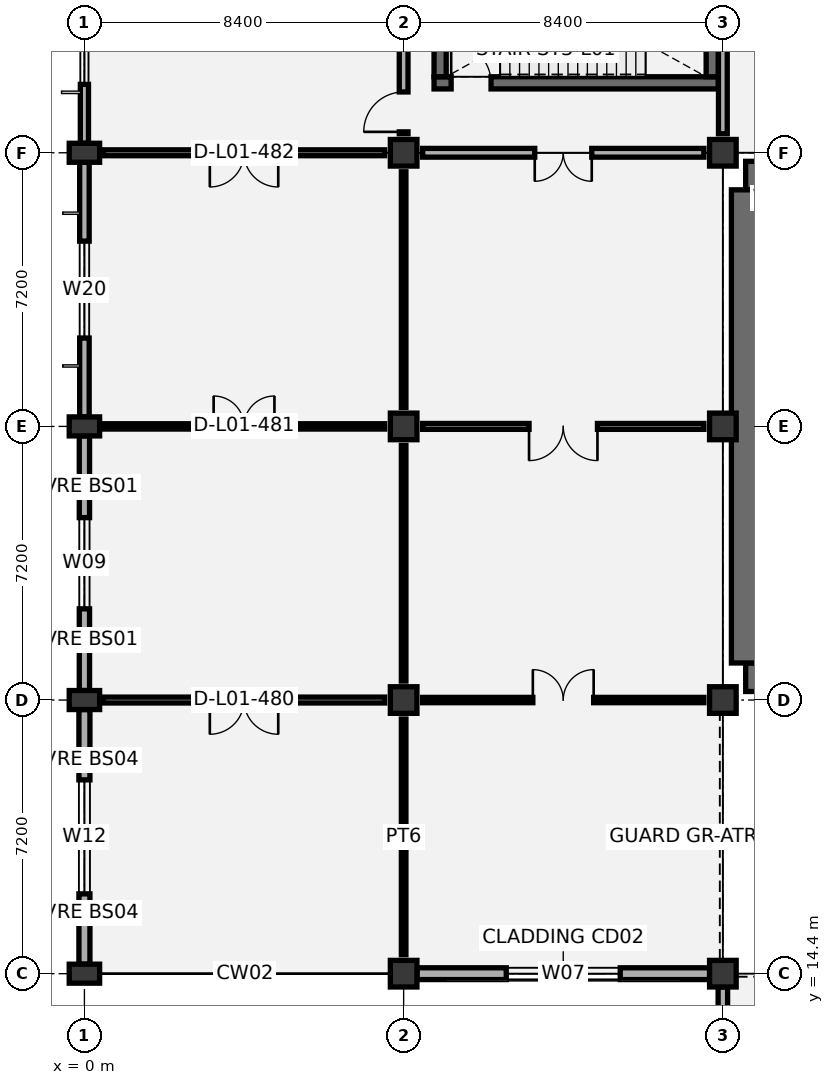
"""IFC4 building model, lengths in metres.
Left out: names, types, materials, properties, quantities, classifications, styles, units other than length and angle.
Written with IfcOpenShell. Run it as: python <this file> out.ifc"""

import sys

from ifc_helpers import new_model, si_unit, direction, frame, frame_2d, origin, origin_2d, place, context, subcontext, project, spatial, rectangle, extrude, element, fill, save


model = new_model("IFC4")
c1 = context("Model", 3, precision=1e-05, world=origin(), true_north=direction((0.0, 1.0)))
c2 = subcontext(c1, "Body", "Model", "MODEL_VIEW")
j1 = project(units=[si_unit("LENGTHUNIT", "METRE"), si_unit("PLANEANGLEUNIT", "RADIAN")], contexts=[c1])
p1 = place(None, origin())
s1 = spatial("IfcSite", under=j1, at=p1, CompositionType="ELEMENT")
p2 = place(p1, origin())
s2 = spatial("IfcBuilding", under=s1, at=p2, CompositionType="ELEMENT")
p3 = place(p2, frame((0.0, 0.0, 6.0)))
s3 = spatial("IfcBuildingStorey", under=s2, at=p3, CompositionType="ELEMENT", Elevation=6.0)
for number, where, z_axis, x_axis in (
    (1, (0.0, 14.4, 0.0), (0.0, 0.0, 1.0), (0.0, 1.0, 0.0)),
    (2, (0.0, 21.6, 0.0), (0.0, 0.0, 1.0), (0.0, 1.0, 0.0)),
    (3, (0.0, 28.8, 0.0), (0.0, 0.0, 1.0), (0.0, 1.0, 0.0)),
    (4, (0.0, 36.0, 0.0), (0.0, 0.0, 1.0), (0.0, 1.0, 0.0)),
):
    element("IfcColumn", number, at=place(p3, frame(where, z_axis=z_axis, x_axis=x_axis)), inside=s3, PredefinedType="COLUMN", context=c2, shape_type="SweptSolid", body=[
        extrude(rectangle(XDim=0.5, YDim=0.8, at=origin_2d()), origin(), (0.0, 0.0, 1.0), 5.4),
    ])
for number, where, z_axis, x_axis in (
    (5, (8.4, 14.4, 0.0), (0.0, 0.0, 1.0), (1.0, 0.0, 0.0)),
    (6, (8.4, 21.6, 0.0), (0.0, 0.0, 1.0), (1.0, 0.0, 0.0)),
    (7, (8.4, 28.8, 0.0), (0.0, 0.0, 1.0), (1.0, 0.0, 0.0)),
    (8, (8.4, 36.0, 0.0), (0.0, 0.0, 1.0), (1.0, 0.0, 0.0)),
    (9, (16.8, 14.4, 0.0), (0.0, 0.0, 1.0), (1.0, 0.0, 0.0)),
    (10, (16.8, 21.6, 0.0), (0.0, 0.0, 1.0), (1.0, 0.0, 0.0)),
    (11, (16.8, 28.8, 0.0), (0.0, 0.0, 1.0), (1.0, 0.0, 0.0)),
    (12, (16.8, 36.0, 0.0), (0.0, 0.0, 1.0), (1.0, 0.0, 0.0)),
):
    element("IfcColumn", number, at=place(p3, frame(where, z_axis=z_axis, x_axis=x_axis)), inside=s3, PredefinedType="COLUMN", context=c2, shape_type="SweptSolid", body=[
        extrude(rectangle(XDim=0.7, YDim=0.7, at=origin_2d()), origin(), (0.0, 0.0, 1.0), 5.4),
    ])
for number, where, z_axis, x_axis in (
    (13, (17.4, 22.2, 0.0), (0.0, 0.0, 1.0), (1.0, 0.0, 0.0)),
    (14, (17.4, 35.4, 0.0), (0.0, 0.0, 1.0), (1.0, 0.0, 0.0)),
):
    element("IfcWall", number, at=place(p3, frame(where, z_axis=z_axis, x_axis=x_axis)), inside=s3, PredefinedType="SOLIDWALL", context=c2, shape_type="SweptSolid", body=[
        extrude(rectangle(XDim=24.0, YDim=0.75, at=frame_2d((12.0, 0.0))), origin(), (0.0, 0.0, 1.0), 3.6),
    ])
p4 = place(p3, frame((17.4, 22.575, 0.0), z_axis=(0.0, 0.0, 1.0), x_axis=(0.0, 1.0, 0.0)))
e15 = element("IfcWall", 15, at=p4, inside=s3, PredefinedType="SOLIDWALL", context=c2, shape_type="SweptSolid", body=[
    extrude(rectangle(XDim=12.45, YDim=0.75, at=frame_2d((6.225, 0.0))), origin(), (0.0, 0.0, 1.0), 3.6),
])
p5 = place(p3, frame((9.2, 37.84, 0.0), z_axis=(0.0, 0.0, 1.0), x_axis=(1.0, 0.0, 0.0)))
e16 = element("IfcWall", 16, at=p5, inside=s3, PredefinedType="SHEAR", context=c2, shape_type="SweptSolid", body=[
    extrude(rectangle(XDim=7.48, YDim=0.32, at=frame_2d((3.74, 0.0))), origin(), (0.0, 0.0, 1.0), 5.075),
])
p6 = place(p5, frame((0.45, 0.0, 0.0)))
e17 = element("IfcOpeningElement", 17, at=p6, cuts=e16, PredefinedType="OPENING", context=c2, shape_type="SweptSolid", body=[
    extrude(rectangle(XDim=1.05, YDim=2.15, at=frame_2d((0.525, 1.075))), frame((0.0, 0.17, 0.0), z_axis=(0.0, -1.0, 0.0), x_axis=(1.0, 0.0, 0.0)), (0.0, 0.0, 1.0), 0.34),
])
for number, where, z_axis, x_axis in (
    (18, (9.36, 38.0, 0.0), (0.0, 0.0, 1.0), (0.0, 1.0, 0.0)),
    (19, (16.52, 38.0, 0.0), (0.0, 0.0, 1.0), (0.0, 1.0, 0.0)),
):
    element("IfcWall", number, at=place(p3, frame(where, z_axis=z_axis, x_axis=x_axis)), inside=s3, PredefinedType="SHEAR", context=c2, shape_type="SweptSolid", body=[
        extrude(rectangle(XDim=3.8, YDim=0.32, at=frame_2d((1.9, 0.0))), origin(), (0.0, 0.0, 1.0), 5.075),
    ])
p7 = place(p3, frame((0.0, 14.65, 0.0), z_axis=(0.0, 0.0, 1.0), x_axis=(0.0, 1.0, 0.0)))
e20 = element("IfcWall", 20, at=p7, inside=s3, PredefinedType="SOLIDWALL", context=c2, shape_type="SweptSolid", body=[
    extrude(rectangle(XDim=6.7, YDim=0.29, at=frame_2d((3.35, 0.0))), origin(), (0.0, 0.0, 1.0), 4.52),
])
p8 = place(p7, frame((1.85, 0.0, 0.9)))
e21 = element("IfcOpeningElement", 21, at=p8, cuts=e20, PredefinedType="OPENING", context=c2, shape_type="SweptSolid", body=[
    extrude(rectangle(XDim=3.0, YDim=2.4, at=frame_2d((1.5, 1.2))), frame((0.0, 0.155, 0.0), z_axis=(0.0, -1.0, 0.0), x_axis=(1.0, 0.0, 0.0)), (0.0, 0.0, 1.0), 0.31),
])
p9 = place(p3, frame((0.0, 21.85, 0.0), z_axis=(0.0, 0.0, 1.0), x_axis=(0.0, 1.0, 0.0)))
e22 = element("IfcWall", 22, at=p9, inside=s3, PredefinedType="SOLIDWALL", context=c2, shape_type="SweptSolid", body=[
    extrude(rectangle(XDim=6.7, YDim=0.27, at=frame_2d((3.35, 0.0))), origin(), (0.0, 0.0, 1.0), 4.52),
])
p10 = place(p9, frame((2.15, 0.0, 0.9)))
e23 = element("IfcOpeningElement", 23, at=p10, cuts=e22, PredefinedType="OPENING", context=c2, shape_type="SweptSolid", body=[
    extrude(rectangle(XDim=2.4, YDim=2.1, at=frame_2d((1.2, 1.05))), frame((0.0, 0.145, 0.0), z_axis=(0.0, -1.0, 0.0), x_axis=(1.0, 0.0, 0.0)), (0.0, 0.0, 1.0), 0.29),
])
p11 = place(p3, frame((0.0, 29.05, 0.0), z_axis=(0.0, 0.0, 1.0), x_axis=(0.0, 1.0, 0.0)))
e24 = element("IfcWall", 24, at=p11, inside=s3, PredefinedType="SOLIDWALL", context=c2, shape_type="SweptSolid", body=[
    extrude(rectangle(XDim=6.7, YDim=0.25, at=frame_2d((3.35, 0.0))), origin(), (0.0, 0.0, 1.0), 4.52),
])
p12 = place(p11, frame((2.075, 0.0, 0.9)))
e25 = element("IfcOpeningElement", 25, at=p12, cuts=e24, PredefinedType="OPENING", context=c2, shape_type="SweptSolid", body=[
    extrude(rectangle(XDim=2.55, YDim=1.95, at=frame_2d((1.275, 0.975))), frame((0.0, 0.135, 0.0), z_axis=(0.0, -1.0, 0.0), x_axis=(1.0, 0.0, 0.0)), (0.0, 0.0, 1.0), 0.27),
])
p13 = place(p3, frame((0.0, 36.25, 0.0), z_axis=(0.0, 0.0, 1.0), x_axis=(0.0, 1.0, 0.0)))
e26 = element("IfcWall", 26, at=p13, inside=s3, PredefinedType="SOLIDWALL", context=c2, shape_type="SweptSolid", body=[
    extrude(rectangle(XDim=6.7, YDim=0.215, at=frame_2d((3.35, 0.0))), origin(), (0.0, 0.0, 1.0), 4.52),
])
p14 = place(p13, frame((1.55, 0.0, 0.9)))
e27 = element("IfcOpeningElement", 27, at=p14, cuts=e26, PredefinedType="OPENING", context=c2, shape_type="SweptSolid", body=[
    extrude(rectangle(XDim=3.6, YDim=2.4, at=frame_2d((1.8, 1.2))), frame((0.0, 0.117, 0.0), z_axis=(0.0, -1.0, 0.0), x_axis=(1.0, 0.0, 0.0)), (0.0, 0.0, 1.0), 0.235),
])
p15 = place(p3, frame((8.75, 14.4, 0.0), z_axis=(0.0, 0.0, 1.0), x_axis=(1.0, 0.0, 0.0)))
e28 = element("IfcWall", 28, at=p15, inside=s3, PredefinedType="SOLIDWALL", context=c2, shape_type="SweptSolid", body=[
    extrude(rectangle(XDim=7.7, YDim=0.31, at=frame_2d((3.85, 0.0))), origin(), (0.0, 0.0, 1.0), 4.42),
])
p16 = place(p15, frame((2.35, 0.0, 0.9)))
e29 = element("IfcOpeningElement", 29, at=p16, cuts=e28, PredefinedType="OPENING", context=c2, shape_type="SweptSolid", body=[
    extrude(rectangle(XDim=3.0, YDim=2.1, at=frame_2d((1.5, 1.05))), frame((0.0, 0.165, 0.0), z_axis=(0.0, -1.0, 0.0), x_axis=(1.0, 0.0, 0.0)), (0.0, 0.0, 1.0), 0.33),
])
p17 = place(p3, frame((16.8, 7.55, 0.0), z_axis=(0.0, 0.0, 1.0), x_axis=(0.0, 1.0, 0.0)))
e30 = element("IfcWall", 30, at=p17, inside=s3, PredefinedType="SOLIDWALL", context=c2, shape_type="SweptSolid", body=[
    extrude(rectangle(XDim=6.5, YDim=0.25, at=frame_2d((3.25, 0.0))), origin(), (0.0, 0.0, 1.0), 4.42),
])
p18 = place(p17, frame((1.825, 0.0, 0.9)))
e31 = element("IfcOpeningElement", 31, at=p18, cuts=e30, PredefinedType="OPENING", context=c2, shape_type="SweptSolid", body=[
    extrude(rectangle(XDim=2.85, YDim=1.95, at=frame_2d((1.425, 0.975))), frame((0.0, 0.135, 0.0), z_axis=(0.0, -1.0, 0.0), x_axis=(1.0, 0.0, 0.0)), (0.0, 0.0, 1.0), 0.27),
])
p19 = place(p3, frame((0.0, 7.32, 0.0), z_axis=(0.0, 0.0, 1.0), x_axis=(0.0, 1.0, 0.0)))
e32 = element("IfcWall", 32, at=p19, inside=s3, PredefinedType="PARAPET", context=c2, shape_type="SweptSolid", body=[
    extrude(rectangle(XDim=6.96, YDim=0.22, at=frame_2d((3.48, 0.0))), origin(), (0.0, 0.0, 1.0), 1.15),
])
p20 = place(p3, frame((8.4, 14.9, 0.0), z_axis=(0.0, 0.0, 1.0), x_axis=(0.0, 1.0, 0.0)))
e33 = element("IfcWall", 33, at=p20, inside=s3, PredefinedType="PARTITIONING", context=c2, shape_type="SweptSolid", body=[
    extrude(rectangle(XDim=6.2, YDim=0.12, at=frame_2d((3.1, 0.0))), origin(), (0.0, 0.0, 1.0), 4.57),
])
p21 = place(p3, frame((0.5, 21.6, 0.0), z_axis=(0.0, 0.0, 1.0), x_axis=(1.0, 0.0, 0.0)))
e34 = element("IfcWall", 34, at=p21, inside=s3, PredefinedType="PARTITIONING", context=c2, shape_type="SweptSolid", body=[
    extrude(rectangle(XDim=7.4, YDim=0.155, at=frame_2d((3.7, 0.0))), origin(), (0.0, 0.0, 1.0), 4.37),
])
p22 = place(p21, frame((2.8, 0.0, 0.0)))
e35 = element("IfcOpeningElement", 35, at=p22, cuts=e34, PredefinedType="OPENING", context=c2, shape_type="SweptSolid", body=[
    extrude(rectangle(XDim=1.8, YDim=2.25, at=frame_2d((0.9, 1.125))), frame((0.0, 0.087, 0.0), z_axis=(0.0, -1.0, 0.0), x_axis=(1.0, 0.0, 0.0)), (0.0, 0.0, 1.0), 0.175),
])
p23 = place(p3, frame((8.4, 22.1, 0.0), z_axis=(0.0, 0.0, 1.0), x_axis=(0.0, 1.0, 0.0)))
e36 = element("IfcWall", 36, at=p23, inside=s3, PredefinedType="PARTITIONING", context=c2, shape_type="SweptSolid", body=[
    extrude(rectangle(XDim=6.2, YDim=0.12, at=frame_2d((3.1, 0.0))), origin(), (0.0, 0.0, 1.0), 4.32),
])
p24 = place(p3, frame((0.5, 28.8, 0.0), z_axis=(0.0, 0.0, 1.0), x_axis=(1.0, 0.0, 0.0)))
e37 = element("IfcWall", 37, at=p24, inside=s3, PredefinedType="PARTITIONING", context=c2, shape_type="SweptSolid", body=[
    extrude(rectangle(XDim=7.4, YDim=0.14, at=frame_2d((3.7, 0.0))), origin(), (0.0, 0.0, 1.0), 4.37),
])
p25 = place(p24, frame((2.9, 0.0, 0.0)))
e38 = element("IfcOpeningElement", 38, at=p25, cuts=e37, PredefinedType="OPENING", context=c2, shape_type="SweptSolid", body=[
    extrude(rectangle(XDim=1.6, YDim=2.2, at=frame_2d((0.8, 1.1))), frame((0.0, 0.08, 0.0), z_axis=(0.0, -1.0, 0.0), x_axis=(1.0, 0.0, 0.0)), (0.0, 0.0, 1.0), 0.16),
])
p26 = place(p3, frame((8.4, 29.3, 0.0), z_axis=(0.0, 0.0, 1.0), x_axis=(0.0, 1.0, 0.0)))
e39 = element("IfcWall", 39, at=p26, inside=s3, PredefinedType="PARTITIONING", context=c2, shape_type="SweptSolid", body=[
    extrude(rectangle(XDim=6.2, YDim=0.12, at=frame_2d((3.1, 0.0))), origin(), (0.0, 0.0, 1.0), 4.67),
])
p27 = place(p3, frame((0.5, 36.0, 0.0), z_axis=(0.0, 0.0, 1.0), x_axis=(1.0, 0.0, 0.0)))
e40 = element("IfcWall", 40, at=p27, inside=s3, PredefinedType="PARTITIONING", context=c2, shape_type="SweptSolid", body=[
    extrude(rectangle(XDim=7.4, YDim=0.155, at=frame_2d((3.7, 0.0))), origin(), (0.0, 0.0, 1.0), 4.37),
])
p28 = place(p27, frame((2.8, 0.0, 0.0)))
e41 = element("IfcOpeningElement", 41, at=p28, cuts=e40, PredefinedType="OPENING", context=c2, shape_type="SweptSolid", body=[
    extrude(rectangle(XDim=1.8, YDim=2.25, at=frame_2d((0.9, 1.125))), frame((0.0, 0.087, 0.0), z_axis=(0.0, -1.0, 0.0), x_axis=(1.0, 0.0, 0.0)), (0.0, 0.0, 1.0), 0.175),
])
p29 = place(p3, frame((8.4, 36.5, 0.0), z_axis=(0.0, 0.0, 1.0), x_axis=(0.0, 1.0, 0.0)))
e42 = element("IfcWall", 42, at=p29, inside=s3, PredefinedType="PARTITIONING", context=c2, shape_type="SweptSolid", body=[
    extrude(rectangle(XDim=6.2, YDim=0.23, at=frame_2d((3.1, 0.0))), origin(), (0.0, 0.0, 1.0), 4.32),
])
p30 = place(p29, frame((0.05, 0.0, 0.0)))
e43 = element("IfcOpeningElement", 43, at=p30, cuts=e42, PredefinedType="OPENING", context=c2, shape_type="SweptSolid", body=[
    extrude(rectangle(XDim=1.05, YDim=2.15, at=frame_2d((0.525, 1.075))), frame((0.0, 0.125, 0.0), z_axis=(0.0, -1.0, 0.0), x_axis=(1.0, 0.0, 0.0)), (0.0, 0.0, 1.0), 0.25),
])
p31 = place(p3, frame((8.9, 21.6, 0.0), z_axis=(0.0, 0.0, 1.0), x_axis=(1.0, 0.0, 0.0)))
e44 = element("IfcWall", 44, at=p31, inside=s3, PredefinedType="PARTITIONING", context=c2, shape_type="SweptSolid", body=[
    extrude(rectangle(XDim=7.4, YDim=0.14, at=frame_2d((3.7, 0.0))), origin(), (0.0, 0.0, 1.0), 4.27),
])
p32 = place(p31, frame((2.9, 0.0, 0.0)))
e45 = element("IfcOpeningElement", 45, at=p32, cuts=e44, PredefinedType="OPENING", context=c2, shape_type="SweptSolid", body=[
    extrude(rectangle(XDim=1.6, YDim=2.2, at=frame_2d((0.8, 1.1))), frame((0.0, 0.08, 0.0), z_axis=(0.0, -1.0, 0.0), x_axis=(1.0, 0.0, 0.0)), (0.0, 0.0, 1.0), 0.16),
])
p33 = place(p3, frame((8.9, 28.8, 0.0), z_axis=(0.0, 0.0, 1.0), x_axis=(1.0, 0.0, 0.0)))
e46 = element("IfcWall", 46, at=p33, inside=s3, PredefinedType="PARTITIONING", context=c2, shape_type="SweptSolid", body=[
    extrude(rectangle(XDim=7.4, YDim=0.155, at=frame_2d((3.7, 0.0))), origin(), (0.0, 0.0, 1.0), 4.27),
])
p34 = place(p33, frame((2.8, 0.0, 0.0)))
e47 = element("IfcOpeningElement", 47, at=p34, cuts=e46, PredefinedType="OPENING", context=c2, shape_type="SweptSolid", body=[
    extrude(rectangle(XDim=1.8, YDim=2.25, at=frame_2d((0.9, 1.125))), frame((0.0, 0.087, 0.0), z_axis=(0.0, -1.0, 0.0), x_axis=(1.0, 0.0, 0.0)), (0.0, 0.0, 1.0), 0.175),
])
p35 = place(p3, frame((8.9, 36.0, 0.0), z_axis=(0.0, 0.0, 1.0), x_axis=(1.0, 0.0, 0.0)))
e48 = element("IfcWall", 48, at=p35, inside=s3, PredefinedType="PARTITIONING", context=c2, shape_type="SweptSolid", body=[
    extrude(rectangle(XDim=7.4, YDim=0.23, at=frame_2d((3.7, 0.0))), origin(), (0.0, 0.0, 1.0), 4.27),
])
p36 = place(p35, frame((2.95, 0.0, 0.0)))
e49 = element("IfcOpeningElement", 49, at=p36, cuts=e48, PredefinedType="OPENING", context=c2, shape_type="SweptSolid", body=[
    extrude(rectangle(XDim=1.5, YDim=2.15, at=frame_2d((0.75, 1.075))), frame((0.0, 0.125, 0.0), z_axis=(0.0, -1.0, 0.0), x_axis=(1.0, 0.0, 0.0)), (0.0, 0.0, 1.0), 0.25),
])
p37 = place(p3, frame((16.8, 36.5, 0.0), z_axis=(0.0, 0.0, 1.0), x_axis=(0.0, 1.0, 0.0)))
e50 = element("IfcWall", 50, at=p37, inside=s3, PredefinedType="PARTITIONING", context=c2, shape_type="SweptSolid", body=[
    extrude(rectangle(XDim=6.2, YDim=0.23, at=frame_2d((3.1, 0.0))), origin(), (0.0, 0.0, 1.0), 4.42),
])
p38 = place(p8, origin())
e51 = element("IfcWindow", 51, at=p38, inside=s3, PartitioningType="SINGLE_PANEL", PredefinedType="WINDOW", context=c2, shape_type="SweptSolid", body=[
    extrude(rectangle(XDim=3.0, YDim=2.4, at=frame_2d((1.5, 1.2))), frame((0.0, 0.03, 0.0), z_axis=(0.0, -1.0, 0.0), x_axis=(1.0, 0.0, 0.0)), (0.0, 0.0, 1.0), 0.06),
])
fill(e21, e51)
p39 = place(p10, origin())
e52 = element("IfcWindow", 52, at=p39, inside=s3, PartitioningType="SINGLE_PANEL", PredefinedType="WINDOW", context=c2, shape_type="SweptSolid", body=[
    extrude(rectangle(XDim=2.4, YDim=2.1, at=frame_2d((1.2, 1.05))), frame((0.0, 0.03, 0.0), z_axis=(0.0, -1.0, 0.0), x_axis=(1.0, 0.0, 0.0)), (0.0, 0.0, 1.0), 0.06),
])
fill(e23, e52)
p40 = place(p12, origin())
e53 = element("IfcWindow", 53, at=p40, inside=s3, PartitioningType="SINGLE_PANEL", PredefinedType="WINDOW", context=c2, shape_type="SweptSolid", body=[
    extrude(rectangle(XDim=2.55, YDim=1.95, at=frame_2d((1.275, 0.975))), frame((0.0, 0.03, 0.0), z_axis=(0.0, -1.0, 0.0), x_axis=(1.0, 0.0, 0.0)), (0.0, 0.0, 1.0), 0.06),
])
fill(e25, e53)
p41 = place(p14, origin())
e54 = element("IfcWindow", 54, at=p41, inside=s3, PartitioningType="SINGLE_PANEL", PredefinedType="WINDOW", context=c2, shape_type="SweptSolid", body=[
    extrude(rectangle(XDim=3.6, YDim=2.4, at=frame_2d((1.8, 1.2))), frame((0.0, 0.03, 0.0), z_axis=(0.0, -1.0, 0.0), x_axis=(1.0, 0.0, 0.0)), (0.0, 0.0, 1.0), 0.06),
])
fill(e27, e54)
p42 = place(p16, origin())
e55 = element("IfcWindow", 55, at=p42, inside=s3, PartitioningType="SINGLE_PANEL", PredefinedType="WINDOW", context=c2, shape_type="SweptSolid", body=[
    extrude(rectangle(XDim=3.0, YDim=2.1, at=frame_2d((1.5, 1.05))), frame((0.0, 0.03, 0.0), z_axis=(0.0, -1.0, 0.0), x_axis=(1.0, 0.0, 0.0)), (0.0, 0.0, 1.0), 0.06),
])
fill(e29, e55)
p43 = place(p6, origin())
e56 = element("IfcDoor", 56, at=p43, inside=s3, OperationType="SINGLE_SWING_LEFT", PredefinedType="DOOR", context=c2, shape_type="SweptSolid", body=[
    extrude(rectangle(XDim=1.05, YDim=2.15, at=frame_2d((0.525, 1.075))), frame((0.0, 0.025, 0.0), z_axis=(0.0, -1.0, 0.0), x_axis=(1.0, 0.0, 0.0)), (0.0, 0.0, 1.0), 0.05),
])
fill(e17, e56)
p44 = place(p22, frame((1.8, 0.0, 0.0), z_axis=(0.0, 0.0, 1.0), x_axis=(-1.0, 0.0, 0.0)))
e57 = element("IfcDoor", 57, at=p44, inside=s3, OperationType="DOUBLE_DOOR_SINGLE_SWING", PredefinedType="DOOR", context=c2, shape_type="SweptSolid", body=[
    extrude(rectangle(XDim=1.8, YDim=2.25, at=frame_2d((0.9, 1.125))), frame((0.0, 0.025, 0.0), z_axis=(0.0, -1.0, 0.0), x_axis=(1.0, 0.0, 0.0)), (0.0, 0.0, 1.0), 0.05),
])
fill(e35, e57)
p45 = place(p25, origin())
e58 = element("IfcDoor", 58, at=p45, inside=s3, OperationType="DOUBLE_DOOR_SINGLE_SWING", PredefinedType="DOOR", context=c2, shape_type="SweptSolid", body=[
    extrude(rectangle(XDim=1.6, YDim=2.2, at=frame_2d((0.8, 1.1))), frame((0.0, 0.025, 0.0), z_axis=(0.0, -1.0, 0.0), x_axis=(1.0, 0.0, 0.0)), (0.0, 0.0, 1.0), 0.05),
])
fill(e38, e58)
p46 = place(p28, frame((1.8, 0.0, 0.0), z_axis=(0.0, 0.0, 1.0), x_axis=(-1.0, 0.0, 0.0)))
e59 = element("IfcDoor", 59, at=p46, inside=s3, OperationType="DOUBLE_DOOR_SINGLE_SWING", PredefinedType="DOOR", context=c2, shape_type="SweptSolid", body=[
    extrude(rectangle(XDim=1.8, YDim=2.25, at=frame_2d((0.9, 1.125))), frame((0.0, 0.025, 0.0), z_axis=(0.0, -1.0, 0.0), x_axis=(1.0, 0.0, 0.0)), (0.0, 0.0, 1.0), 0.05),
])
fill(e41, e59)
p47 = place(p30, origin())
e60 = element("IfcDoor", 60, at=p47, inside=s3, OperationType="SINGLE_SWING_LEFT", PredefinedType="DOOR", context=c2, shape_type="SweptSolid", body=[
    extrude(rectangle(XDim=1.05, YDim=2.15, at=frame_2d((0.525, 1.075))), frame((0.0, 0.025, 0.0), z_axis=(0.0, -1.0, 0.0), x_axis=(1.0, 0.0, 0.0)), (0.0, 0.0, 1.0), 0.05),
])
fill(e43, e60)
p48 = place(p32, origin())
e61 = element("IfcDoor", 61, at=p48, inside=s3, OperationType="DOUBLE_DOOR_SINGLE_SWING", PredefinedType="DOOR", context=c2, shape_type="SweptSolid", body=[
    extrude(rectangle(XDim=1.6, YDim=2.2, at=frame_2d((0.8, 1.1))), frame((0.0, 0.025, 0.0), z_axis=(0.0, -1.0, 0.0), x_axis=(1.0, 0.0, 0.0)), (0.0, 0.0, 1.0), 0.05),
])
fill(e45, e61)
p49 = place(p34, frame((1.8, 0.0, 0.0), z_axis=(0.0, 0.0, 1.0), x_axis=(-1.0, 0.0, 0.0)))
e62 = element("IfcDoor", 62, at=p49, inside=s3, OperationType="DOUBLE_DOOR_SINGLE_SWING", PredefinedType="DOOR", context=c2, shape_type="SweptSolid", body=[
    extrude(rectangle(XDim=1.8, YDim=2.25, at=frame_2d((0.9, 1.125))), frame((0.0, 0.025, 0.0), z_axis=(0.0, -1.0, 0.0), x_axis=(1.0, 0.0, 0.0)), (0.0, 0.0, 1.0), 0.05),
])
fill(e47, e62)
p50 = place(p36, frame((1.5, 0.0, 0.0), z_axis=(0.0, 0.0, 1.0), x_axis=(-1.0, 0.0, 0.0)))
e63 = element("IfcDoor", 63, at=p50, inside=s3, OperationType="DOUBLE_DOOR_SINGLE_SWING", PredefinedType="DOOR", context=c2, shape_type="SweptSolid", body=[
    extrude(rectangle(XDim=1.5, YDim=2.15, at=frame_2d((0.75, 1.075))), frame((0.0, 0.025, 0.0), z_axis=(0.0, -1.0, 0.0), x_axis=(1.0, 0.0, 0.0)), (0.0, 0.0, 1.0), 0.05),
])
fill(e49, e63)
save(model, sys.argv[1])
